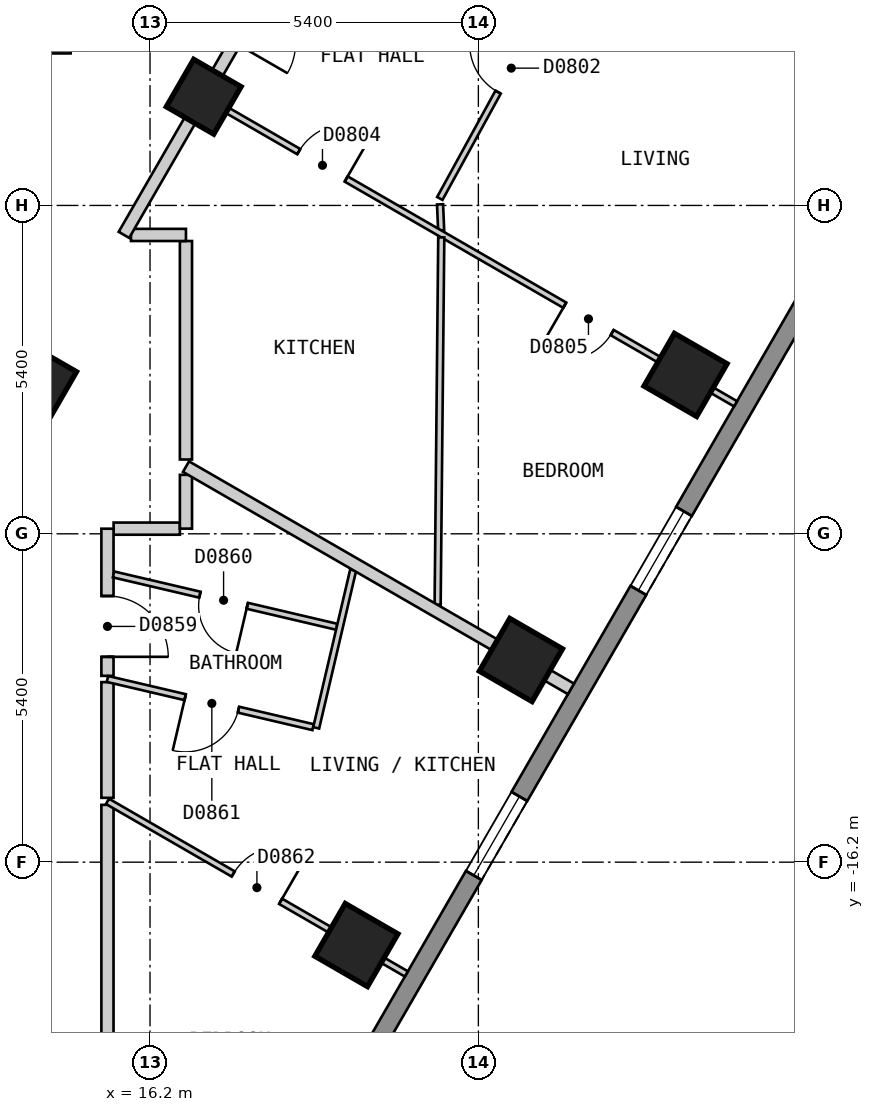
"""IFC4 building model, lengths in metres.
Left out: names, types, materials, properties, quantities, classifications, styles, units other than length and angle.
Written with IfcOpenShell. Run it as: python <this file> out.ifc"""

import sys

from ifc_helpers import new_model, si_unit, direction, frame, frame_2d, origin, origin_2d, place, context, subcontext, project, spatial, polyline, rectangle, outline, extrude, element, fill, save


model = new_model("IFC4")
c1 = context("Model", 3, precision=1e-05, world=origin(), true_north=direction((0.0, 1.0)))
c2 = subcontext(c1, "Body", "Model", "MODEL_VIEW")
j1 = project(units=[si_unit("LENGTHUNIT", "METRE"), si_unit("PLANEANGLEUNIT", "RADIAN")], contexts=[c1])
p1 = place(None, origin())
s1 = spatial("IfcSite", under=j1, at=p1, CompositionType="ELEMENT")
p2 = place(p1, origin())
s2 = spatial("IfcBuilding", under=s1, at=p2, CompositionType="ELEMENT")
p3 = place(p2, frame((0.0, 0.0, 72.0)))
s3 = spatial("IfcBuildingStorey", under=s2, at=p3, CompositionType="ELEMENT", Elevation=72.0)
for number, where, z_axis, x_axis in (
    (1, (19.594, -17.563, 0.0), (0.0, 0.0, 1.0), (0.5, 0.866, 0.0)),
    (2, (22.3, -12.875, 0.0), (0.0, 0.0, 1.0), (0.5, 0.866, 0.0)),
    (3, (25.007, -8.187, 0.0), (0.0, 0.0, 1.0), (0.5, 0.866, 0.0)),
):
    element("IfcColumn", number, at=place(p3, frame(where, z_axis=z_axis, x_axis=x_axis)), inside=s3, PredefinedType="COLUMN", context=c2, shape_type="SweptSolid", body=[
        extrude(rectangle(XDim=1.0, YDim=1.0, at=origin_2d()), origin(), (0.0, 0.0, 1.0), 3.0),
    ])
for number, where, z_axis, x_axis in (
    (4, (14.376, -8.3, 0.0), (0.0, 0.0, 1.0), (0.5, 0.866, 0.0)),
    (5, (17.083, -3.612, 0.0), (0.0, 0.0, 1.0), (0.5, 0.866, 0.0)),
):
    element("IfcColumn", number, at=place(p3, frame(where, z_axis=z_axis, x_axis=x_axis)), inside=s3, PredefinedType="COLUMN", context=c2, shape_type="SweptSolid", body=[
        extrude(rectangle(XDim=0.9, YDim=0.9, at=origin_2d()), origin(), (0.0, 0.0, 1.0), 3.0),
    ])
p4 = place(p3, frame((17.479, -23.425, 0.0), z_axis=(0.0, 0.0, 1.0), x_axis=(0.500035407905, 0.866004960056, 0.0)))
e6 = element("IfcWall", 6, at=p4, inside=s3, PredefinedType="SOLIDWALL", context=c2, shape_type="SweptSolid", body=[
    extrude(outline(polyline([(0.0, -0.15), (23.094, -0.15), (23.014, 0.15), (0.08, 0.15), (0.0, -0.15)])), origin(), (0.0, 0.0, 1.0), 2.7),
])
p5 = place(p4, frame((2.677, 0.0, 0.15)))
e7 = element("IfcOpeningElement", 7, at=p5, cuts=e6, PredefinedType="OPENING", context=c2, shape_type="SweptSolid", body=[
    extrude(rectangle(XDim=1.5, YDim=2.1, at=frame_2d((0.75, 1.05))), frame((0.0, 0.16, 0.0), z_axis=(0.0, -1.0, 0.0), x_axis=(1.0, 0.0, 0.0)), (0.0, 0.0, 1.0), 0.32),
])
p6 = place(p4, frame((8.091, 0.0, 0.15)))
e8 = element("IfcOpeningElement", 8, at=p6, cuts=e6, PredefinedType="OPENING", context=c2, shape_type="SweptSolid", body=[
    extrude(rectangle(XDim=1.5, YDim=2.1, at=frame_2d((0.75, 1.05))), frame((0.0, 0.16, 0.0), z_axis=(0.0, -1.0, 0.0), x_axis=(1.0, 0.0, 0.0)), (0.0, 0.0, 1.0), 0.32),
])
p7 = place(p4, frame((13.504, 0.0, 0.15)))
e9 = element("IfcOpeningElement", 9, at=p7, cuts=e6, PredefinedType="OPENING", context=c2, shape_type="SweptSolid", body=[
    extrude(rectangle(XDim=1.5, YDim=2.1, at=frame_2d((0.75, 1.05))), frame((0.0, 0.16, 0.0), z_axis=(0.0, -1.0, 0.0), x_axis=(1.0, 0.0, 0.0)), (0.0, 0.0, 1.0), 0.32),
])
p8 = place(p4, frame((18.917, 0.0, 0.15)))
e10 = element("IfcOpeningElement", 10, at=p8, cuts=e6, PredefinedType="OPENING", context=c2, shape_type="SweptSolid", body=[
    extrude(rectangle(XDim=1.5, YDim=2.1, at=frame_2d((0.75, 1.05))), frame((0.0, 0.16, 0.0), z_axis=(0.0, -1.0, 0.0), x_axis=(1.0, 0.0, 0.0)), (0.0, 0.0, 1.0), 0.32),
])
p9 = place(p3, frame((15.5, -13.239, 0.0), z_axis=(0.0, 0.0, 1.0), x_axis=(0.0, -1.0, 0.0)))
e11 = element("IfcWall", 11, at=p9, inside=s3, PredefinedType="PARTITIONING", context=c2, shape_type="SweptSolid", body=[
    extrude(rectangle(XDim=1.903, YDim=0.2, at=frame_2d((0.952, 0.0))), origin(), (0.0, 0.0, 1.0), 2.7),
])
p10 = place(p3, frame((16.791, -5.985, 0.0), z_axis=(0.0, 0.0, 1.0), x_axis=(0.0, -1.0, 0.0)))
e12 = element("IfcWall", 12, at=p10, inside=s3, PredefinedType="PARTITIONING", context=c2, shape_type="SweptSolid", body=[
    extrude(rectangle(XDim=3.593, YDim=0.2, at=frame_2d((1.796, 0.0))), origin(), (0.0, 0.0, 1.0), 2.7),
])
p11 = place(p3, frame((15.887, -5.885, 0.0), z_axis=(0.0, 0.0, 1.0), x_axis=(1.0, 0.0, 0.0)))
e13 = element("IfcWall", 13, at=p11, inside=s3, PredefinedType="PARTITIONING", context=c2, shape_type="SweptSolid", body=[
    extrude(rectangle(XDim=0.904, YDim=0.2, at=frame_2d((0.452, 0.0))), origin(), (0.0, 0.0, 1.0), 2.7),
])
p12 = place(p3, frame((15.601, -10.715, 0.0), z_axis=(0.0, 0.0, 1.0), x_axis=(1.0, 0.0, 0.0)))
e14 = element("IfcWall", 14, at=p12, inside=s3, PredefinedType="PARTITIONING", context=c2, shape_type="SweptSolid", body=[
    extrude(rectangle(XDim=1.09, YDim=0.2, at=frame_2d((0.545, 0.0))), origin(), (0.0, 0.0, 1.0), 2.7),
])
p13 = place(p3, frame((6.929, -2.8, 0.0), z_axis=(0.0, 0.0, 1.0), x_axis=(1.0, 0.0, 0.0)))
e15 = element("IfcWall", 15, at=p13, inside=s3, PredefinedType="PARTITIONING", context=c2, shape_type="SweptSolid", body=[
    extrude(rectangle(XDim=7.966, YDim=0.2, at=frame_2d((3.983, 0.0))), origin(), (0.0, 0.0, 1.0), 2.7),
])
p14 = place(p3, frame((15.771, -5.884, 0.0), z_axis=(0.0, 0.0, 1.0), x_axis=(0.499939494019, 0.866060334111, 0.0)))
e16 = element("IfcWall", 16, at=p14, inside=s3, PredefinedType="PARTITIONING", context=c2, shape_type="SweptSolid", body=[
    extrude(rectangle(XDim=5.583, YDim=0.2, at=frame_2d((2.792, 0.0))), origin(), (0.0, 0.0, 1.0), 2.7),
])
p15 = place(p14, frame((3.647, 0.0, 0.0)))
e17 = element("IfcOpeningElement", 17, at=p15, cuts=e16, PredefinedType="OPENING", context=c2, shape_type="SweptSolid", body=[
    extrude(rectangle(XDim=1.0, YDim=2.1, at=frame_2d((0.5, 1.05))), frame((0.0, 0.11, 0.0), z_axis=(0.0, -1.0, 0.0), x_axis=(1.0, 0.0, 0.0)), (0.0, 0.0, 1.0), 0.22),
])
p16 = place(p3, frame((15.5, -21.199, 0.0), z_axis=(0.0, 0.0, 1.0), x_axis=(0.0, 1.0, 0.0)))
e18 = element("IfcWall", 18, at=p16, inside=s3, PredefinedType="PARTITIONING", context=c2, shape_type="SweptSolid", body=[
    extrude(rectangle(XDim=5.942, YDim=0.2, at=frame_2d((2.971, 0.0))), origin(), (0.0, 0.0, 1.0), 2.7),
])
p17 = place(p3, frame((15.5, -13.136, 0.0), z_axis=(0.0, 0.0, 1.0), x_axis=(0.0, 1.0, 0.0)))
e19 = element("IfcWall", 19, at=p17, inside=s3, PredefinedType="PARTITIONING", context=c2, shape_type="SweptSolid", body=[
    extrude(rectangle(XDim=2.42, YDim=0.2, at=frame_2d((1.21, 0.0))), origin(), (0.0, 0.0, 1.0), 2.7),
])
p18 = place(p17, frame((0.313, 0.0, 0.0)))
e20 = element("IfcOpeningElement", 20, at=p18, cuts=e19, PredefinedType="OPENING", context=c2, shape_type="SweptSolid", body=[
    extrude(rectangle(XDim=1.0, YDim=2.1, at=frame_2d((0.5, 1.05))), frame((0.0, 0.11, 0.0), z_axis=(0.0, -1.0, 0.0), x_axis=(1.0, 0.0, 0.0)), (0.0, 0.0, 1.0), 0.22),
])
p19 = place(p3, frame((16.791, -10.715, 0.0), z_axis=(0.0, 0.0, 1.0), x_axis=(0.0, 1.0, 0.0)))
e21 = element("IfcWall", 21, at=p19, inside=s3, PredefinedType="PARTITIONING", context=c2, shape_type="SweptSolid", body=[
    extrude(rectangle(XDim=0.885, YDim=0.2, at=frame_2d((0.442, 0.0))), origin(), (0.0, 0.0, 1.0), 2.7),
])
p20 = place(p3, frame((20.97, -5.382, 0.0), z_axis=(0.0, 0.0, 1.0), x_axis=(0.042272072097, -0.999106136464, 0.0)))
e22 = element("IfcWall", 22, at=p20, inside=s3, PredefinedType="PARTITIONING", context=c2, shape_type="SweptSolid", body=[
    extrude(rectangle(XDim=0.427, YDim=0.1, at=frame_2d((0.214, 0.0))), origin(), (0.0, 0.0, 1.0), 2.7),
])
p21 = place(p3, frame((15.6, -11.468, 0.0), z_axis=(0.0, 0.0, 1.0), x_axis=(0.973574036597, -0.228371616592, 0.0)))
e23 = element("IfcWall", 23, at=p21, inside=s3, PredefinedType="PARTITIONING", context=c2, shape_type="SweptSolid", body=[
    extrude(rectangle(XDim=3.771, YDim=0.1, at=frame_2d((1.885, 0.0))), origin(), (0.0, 0.0, 1.0), 2.7),
])
p22 = place(p21, frame((1.459, 0.0, 0.0)))
e24 = element("IfcOpeningElement", 24, at=p22, cuts=e23, PredefinedType="OPENING", context=c2, shape_type="SweptSolid", body=[
    extrude(rectangle(XDim=0.8, YDim=2.1, at=frame_2d((0.4, 1.05))), frame((0.0, 0.06, 0.0), z_axis=(0.0, -1.0, 0.0), x_axis=(1.0, 0.0, 0.0)), (0.0, 0.0, 1.0), 0.12),
])
p23 = place(p3, frame((15.5, -13.187, 0.0), z_axis=(0.0, 0.0, 1.0), x_axis=(0.973612163993, -0.228209014119, 0.0)))
e25 = element("IfcWall", 25, at=p23, inside=s3, PredefinedType="PARTITIONING", context=c2, shape_type="SweptSolid", body=[
    extrude(rectangle(XDim=3.475, YDim=0.1, at=frame_2d((1.737, 0.0))), origin(), (0.0, 0.0, 1.0), 2.7),
])
p24 = place(p23, frame((1.313, 0.0, 0.0)))
e26 = element("IfcOpeningElement", 26, at=p24, cuts=e25, PredefinedType="OPENING", context=c2, shape_type="SweptSolid", body=[
    extrude(rectangle(XDim=0.9, YDim=2.1, at=frame_2d((0.45, 1.05))), frame((0.0, 0.06, 0.0), z_axis=(0.0, -1.0, 0.0), x_axis=(1.0, 0.0, 0.0)), (0.0, 0.0, 1.0), 0.12),
])
p25 = place(p3, frame((15.5, -15.2, 0.0), z_axis=(0.0, 0.0, 1.0), x_axis=(0.866035181374, -0.499983064336, 0.0)))
e27 = element("IfcWall", 27, at=p25, inside=s3, PredefinedType="PARTITIONING", context=c2, shape_type="SweptSolid", body=[
    extrude(rectangle(XDim=5.677, YDim=0.1, at=frame_2d((2.838, 0.0))), origin(), (0.0, 0.0, 1.0), 2.7),
])
p26 = place(p25, frame((2.388, 0.0, 0.0)))
e28 = element("IfcOpeningElement", 28, at=p26, cuts=e27, PredefinedType="OPENING", context=c2, shape_type="SweptSolid", body=[
    extrude(rectangle(XDim=0.9, YDim=2.1, at=frame_2d((0.45, 1.05))), frame((0.0, 0.06, 0.0), z_axis=(0.0, -1.0, 0.0), x_axis=(1.0, 0.0, 0.0)), (0.0, 0.0, 1.0), 0.12),
])
p27 = place(p3, frame((17.169, -3.662, 0.0), z_axis=(0.0, 0.0, 1.0), x_axis=(0.866047370643, -0.499961950354, 0.0)))
e29 = element("IfcWall", 29, at=p27, inside=s3, PredefinedType="PARTITIONING", context=c2, shape_type="SweptSolid", body=[
    extrude(rectangle(XDim=10.001, YDim=0.1, at=frame_2d((5.0, 0.0))), origin(), (0.0, 0.0, 1.0), 2.7),
])
p28 = place(p27, frame((1.706, 0.0, 0.0)))
e30 = element("IfcOpeningElement", 30, at=p28, cuts=e29, PredefinedType="OPENING", context=c2, shape_type="SweptSolid", body=[
    extrude(rectangle(XDim=0.9, YDim=2.1, at=frame_2d((0.45, 1.05))), frame((0.0, 0.06, 0.0), z_axis=(0.0, -1.0, 0.0), x_axis=(1.0, 0.0, 0.0)), (0.0, 0.0, 1.0), 0.12),
])
p29 = place(p27, frame((6.757, 0.0, 0.0)))
e31 = element("IfcOpeningElement", 31, at=p29, cuts=e29, PredefinedType="OPENING", context=c2, shape_type="SweptSolid", body=[
    extrude(rectangle(XDim=0.9, YDim=2.1, at=frame_2d((0.45, 1.05))), frame((0.0, 0.06, 0.0), z_axis=(0.0, -1.0, 0.0), x_axis=(1.0, 0.0, 0.0)), (0.0, 0.0, 1.0), 0.12),
])
p30 = place(p3, frame((20.966, -5.285, 0.0), z_axis=(0.0, 0.0, 1.0), x_axis=(0.480851410542, 0.876802099096, 0.0)))
e32 = element("IfcWall", 32, at=p30, inside=s3, PredefinedType="PARTITIONING", context=c2, shape_type="SweptSolid", body=[
    extrude(rectangle(XDim=4.831, YDim=0.1, at=frame_2d((2.416, 0.0))), origin(), (0.0, 0.0, 1.0), 2.7),
])
p31 = place(p30, frame((1.994, 0.0, 0.0)))
e33 = element("IfcOpeningElement", 33, at=p31, cuts=e32, PredefinedType="OPENING", context=c2, shape_type="SweptSolid", body=[
    extrude(rectangle(XDim=0.9, YDim=2.1, at=frame_2d((0.45, 1.05))), frame((0.0, 0.06, 0.0), z_axis=(0.0, -1.0, 0.0), x_axis=(1.0, 0.0, 0.0)), (0.0, 0.0, 1.0), 0.12),
])
p32 = place(p3, frame((18.933, -13.991, 0.0), z_axis=(0.0, 0.0, 1.0), x_axis=(0.228170964135, 0.973621081903, 0.0)))
e34 = element("IfcWall", 34, at=p32, inside=s3, PredefinedType="PARTITIONING", context=c2, shape_type="SweptSolid", body=[
    extrude(rectangle(XDim=2.664, YDim=0.1, at=frame_2d((1.332, 0.0))), origin(), (0.0, 0.0, 1.0), 2.7),
])
p33 = place(p3, frame((20.93, -11.968, 0.0), z_axis=(0.0, 0.0, 1.0), x_axis=(0.009938100012, 0.999950615865, 0.0)))
e35 = element("IfcWall", 35, at=p33, inside=s3, PredefinedType="PARTITIONING", context=c2, shape_type="SweptSolid", body=[
    extrude(rectangle(XDim=6.043, YDim=0.1, at=frame_2d((3.021, 0.0))), origin(), (0.0, 0.0, 1.0), 2.7),
])
p34 = place(p3, frame((16.792, -9.695, 0.0), z_axis=(0.0, 0.0, 1.0), x_axis=(0.86603765469, -0.499978780208, 0.0)))
e36 = element("IfcWall", 36, at=p34, inside=s3, PredefinedType="PARTITIONING", context=c2, shape_type="SweptSolid", body=[
    extrude(rectangle(XDim=7.31, YDim=0.2, at=frame_2d((3.655, 0.0))), origin(), (0.0, 0.0, 1.0), 2.7),
])
p35 = place(p6, origin())
e37 = element("IfcWindow", 37, at=p35, inside=s3, PartitioningType="SINGLE_PANEL", PredefinedType="WINDOW", context=c2, shape_type="SweptSolid", body=[
    extrude(rectangle(XDim=1.5, YDim=2.1, at=frame_2d((0.75, 1.05))), frame((0.0, 0.03, 0.0), z_axis=(0.0, -1.0, 0.0), x_axis=(1.0, 0.0, 0.0)), (0.0, 0.0, 1.0), 0.06),
])
fill(e8, e37)
p36 = place(p7, origin())
e38 = element("IfcWindow", 38, at=p36, inside=s3, PartitioningType="SINGLE_PANEL", PredefinedType="WINDOW", context=c2, shape_type="SweptSolid", body=[
    extrude(rectangle(XDim=1.5, YDim=2.1, at=frame_2d((0.75, 1.05))), frame((0.0, 0.03, 0.0), z_axis=(0.0, -1.0, 0.0), x_axis=(1.0, 0.0, 0.0)), (0.0, 0.0, 1.0), 0.06),
])
fill(e9, e38)
p37 = place(p31, origin())
e39 = element("IfcDoor", 39, at=p37, inside=s3, OperationType="SINGLE_SWING_RIGHT", PredefinedType="DOOR", context=c2, shape_type="SweptSolid", body=[
    extrude(rectangle(XDim=0.9, YDim=2.1, at=frame_2d((0.45, 1.05))), frame((0.0, 0.025, 0.0), z_axis=(0.0, -1.0, 0.0), x_axis=(1.0, 0.0, 0.0)), (0.0, 0.0, 1.0), 0.05),
])
fill(e33, e39)
p38 = place(p28, origin())
e40 = element("IfcDoor", 40, at=p38, inside=s3, OperationType="SINGLE_SWING_RIGHT", PredefinedType="DOOR", context=c2, shape_type="SweptSolid", body=[
    extrude(rectangle(XDim=0.9, YDim=2.1, at=frame_2d((0.45, 1.05))), frame((0.0, 0.025, 0.0), z_axis=(0.0, -1.0, 0.0), x_axis=(1.0, 0.0, 0.0)), (0.0, 0.0, 1.0), 0.05),
])
fill(e30, e40)
p39 = place(p29, origin())
e41 = element("IfcDoor", 41, at=p39, inside=s3, OperationType="SINGLE_SWING_LEFT", PredefinedType="DOOR", context=c2, shape_type="SweptSolid", body=[
    extrude(rectangle(XDim=0.9, YDim=2.1, at=frame_2d((0.45, 1.05))), frame((0.0, 0.025, 0.0), z_axis=(0.0, -1.0, 0.0), x_axis=(1.0, 0.0, 0.0)), (0.0, 0.0, 1.0), 0.05),
])
fill(e31, e41)
p40 = place(p18, origin())
e42 = element("IfcDoor", 42, at=p40, inside=s3, OperationType="SINGLE_SWING_LEFT", PredefinedType="DOOR", context=c2, shape_type="SweptSolid", body=[
    extrude(rectangle(XDim=1.0, YDim=2.1, at=frame_2d((0.5, 1.05))), frame((0.0, 0.025, 0.0), z_axis=(0.0, -1.0, 0.0), x_axis=(1.0, 0.0, 0.0)), (0.0, 0.0, 1.0), 0.05),
])
fill(e20, e42)
p41 = place(p22, origin())
e43 = element("IfcDoor", 43, at=p41, inside=s3, OperationType="SINGLE_SWING_RIGHT", PredefinedType="DOOR", context=c2, shape_type="SweptSolid", body=[
    extrude(rectangle(XDim=0.8, YDim=2.1, at=frame_2d((0.4, 1.05))), frame((0.0, 0.025, 0.0), z_axis=(0.0, -1.0, 0.0), x_axis=(1.0, 0.0, 0.0)), (0.0, 0.0, 1.0), 0.05),
])
fill(e24, e43)
p42 = place(p24, origin())
e44 = element("IfcDoor", 44, at=p42, inside=s3, OperationType="SINGLE_SWING_LEFT", PredefinedType="DOOR", context=c2, shape_type="SweptSolid", body=[
    extrude(rectangle(XDim=0.9, YDim=2.1, at=frame_2d((0.45, 1.05))), frame((0.0, 0.025, 0.0), z_axis=(0.0, -1.0, 0.0), x_axis=(1.0, 0.0, 0.0)), (0.0, 0.0, 1.0), 0.05),
])
fill(e26, e44)
p43 = place(p26, origin())
e45 = element("IfcDoor", 45, at=p43, inside=s3, OperationType="SINGLE_SWING_RIGHT", PredefinedType="DOOR", context=c2, shape_type="SweptSolid", body=[
    extrude(rectangle(XDim=0.9, YDim=2.1, at=frame_2d((0.45, 1.05))), frame((0.0, 0.025, 0.0), z_axis=(0.0, -1.0, 0.0), x_axis=(1.0, 0.0, 0.0)), (0.0, 0.0, 1.0), 0.05),
])
fill(e28, e45)
save(model, sys.argv[1])
